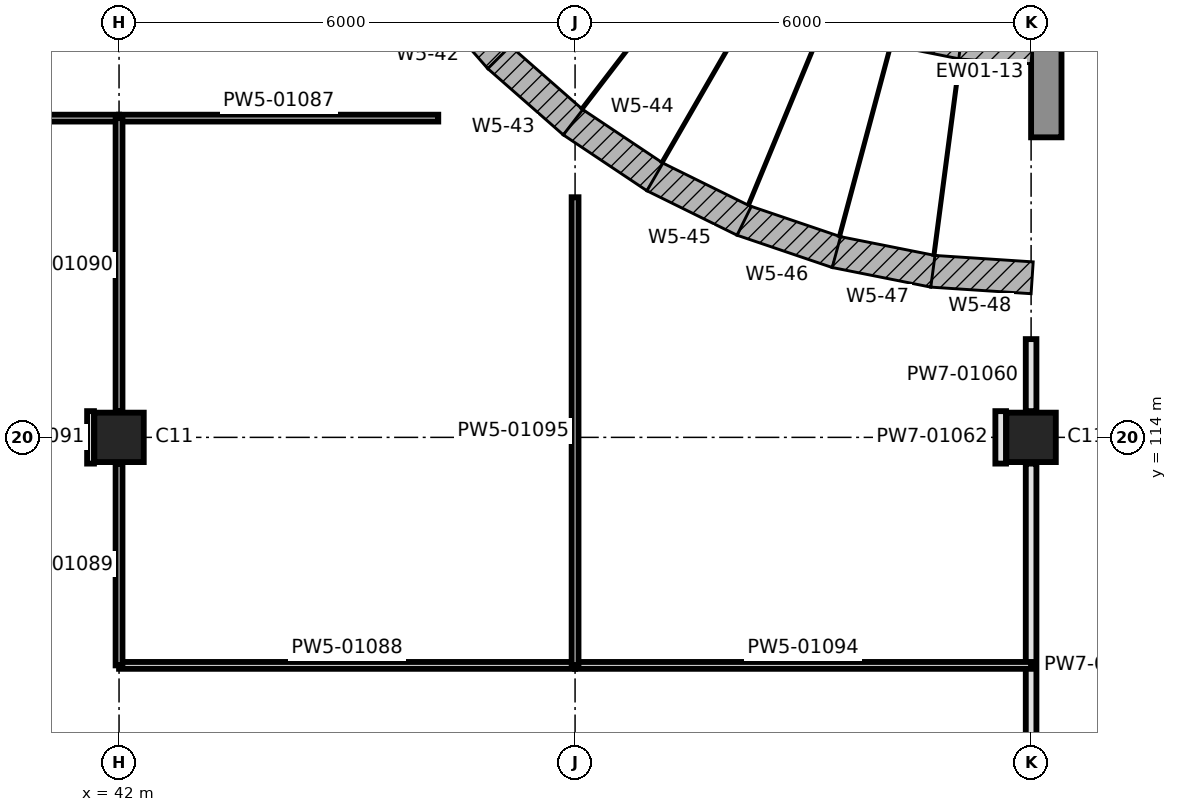
"""IFC4 building model, lengths in metres.
Left out: names, types, materials, properties, quantities, classifications, styles, units other than length and angle.
Written with IfcOpenShell. Run it as: python <this file> out.ifc"""

import sys

from ifc_helpers import new_model, si_unit, direction, frame, frame_2d, origin, origin_2d, place, context, subcontext, project, spatial, polyline, rectangle, outline, extrude, element, fill, save


model = new_model("IFC4")
c1 = context("Model", 3, precision=1e-05, world=origin(), true_north=direction((0.0, 1.0)))
c2 = subcontext(c1, "Body", "Model", "MODEL_VIEW")
j1 = project(units=[si_unit("LENGTHUNIT", "METRE"), si_unit("PLANEANGLEUNIT", "RADIAN")], contexts=[c1])
p1 = place(None, origin())
s1 = spatial("IfcSite", under=j1, at=p1, CompositionType="ELEMENT")
p2 = place(p1, origin())
s2 = spatial("IfcBuilding", under=s1, at=p2, CompositionType="ELEMENT")
p3 = place(p2, frame((0.0, 0.0, 7.0)))
s3 = spatial("IfcBuildingStorey", under=s2, at=p3, CompositionType="ELEMENT", Elevation=7.0)
for number, where, z_axis, x_axis in (
    (1, (42.0, 114.0, 0.0), (0.0, 0.0, 1.0), (1.0, 0.0, 0.0)),
    (2, (54.0, 114.0, 0.0), (0.0, 0.0, 1.0), (1.0, 0.0, 0.0)),
):
    element("IfcColumn", number, at=place(p3, frame(where, z_axis=z_axis, x_axis=x_axis)), inside=s3, PredefinedType="COLUMN", context=c2, shape_type="SweptSolid", body=[
        extrude(rectangle(XDim=0.65, YDim=0.65, at=origin_2d()), origin(), (0.0, 0.0, 1.0), 5.0),
    ])
p4 = place(p3, frame((46.852, 118.851, 0.0), z_axis=(-0.630572172367, -0.553093552863, 0.544487150645), x_axis=(-0.659421060078, 0.751773812455, -2.0792921e-05)))
e3 = element("IfcWall", 3, at=p4, inside=s3, PredefinedType="SOLIDWALL", context=c2, shape_type="SweptSolid", body=[
    extrude(outline(polyline([(0.0, 0.0), (1.322, 5.551e-17), (1.124, -5.544), (0.197, -5.544), (0.0, 0.0)])), origin(), (0.0, 0.544, 0.839), 0.596),
])
p5 = place(p3, frame((47.846, 117.979, 0.0), z_axis=(-0.553093552863, -0.630572172367, 0.544487150645), x_axis=(-0.751773812455, 0.659421060078, 2.0792921e-05)))
e4 = element("IfcWall", 4, at=p5, inside=s3, PredefinedType="SOLIDWALL", context=c2, shape_type="SweptSolid", body=[
    extrude(outline(polyline([(0.0, 0.0), (1.322, -5.551e-17), (1.125, -5.544), (0.198, -5.544), (0.0, 0.0)])), origin(), (-0.0, 0.544, 0.839), 0.596),
])
p6 = place(p3, frame((48.945, 117.244, 0.0), z_axis=(-0.465979494917, -0.697421440223, 0.544487323116), x_axis=(-0.831490422718, 0.555539086285, -2.3173265e-05)))
e5 = element("IfcWall", 5, at=p6, inside=s3, PredefinedType="SOLIDWALL", context=c2, shape_type="SweptSolid", body=[
    extrude(outline(polyline([(0.0, 0.0), (1.322, 0.0), (1.124, -5.544), (0.198, -5.544), (0.0, 0.0)])), origin(), (3.705e-05, 0.544, 0.839), 0.596),
])
p7 = place(p3, frame((50.131, 116.659, 0.0), z_axis=(-0.371027167972, -0.752251892463, 0.544477667964), x_axis=(-0.896847076605, 0.442340729705, -5.472957e-06)))
e6 = element("IfcWall", 6, at=p7, inside=s3, PredefinedType="SOLIDWALL", context=c2, shape_type="SweptSolid", body=[
    extrude(outline(polyline([(0.0, 0.0), (1.322, 0.0), (1.125, -5.544), (0.198, -5.544), (0.0, 0.0)])), origin(), (-5.786e-05, 0.544, 0.839), 0.596),
])
p8 = place(p3, frame((51.384, 116.235, 0.0), z_axis=(-0.269418488523, -0.794324736016, 0.544483141883), x_axis=(-0.947003545328, 0.321223106822, 2.7908524e-05)))
e7 = element("IfcWall", 7, at=p8, inside=s3, PredefinedType="SOLIDWALL", context=c2, shape_type="SweptSolid", body=[
    extrude(outline(polyline([(0.0, 0.0), (1.322, -5.551e-17), (1.124, -5.544), (0.197, -5.544), (0.0, 0.0)])), origin(), (0.0, 0.544, 0.839), 0.596),
])
p9 = place(p3, frame((52.68, 115.977, 0.0), z_axis=(-0.163726196101, -0.822637628243, 0.544482382919), x_axis=(-0.980766332218, 0.19518555592, -1.8656341e-05)))
e8 = element("IfcWall", 8, at=p9, inside=s3, PredefinedType="SOLIDWALL", context=c2, shape_type="SweptSolid", body=[
    extrude(outline(polyline([(0.0, 0.0), (1.322, 0.0), (1.125, -5.544), (0.198, -5.544), (0.0, 0.0)])), origin(), (-9.736e-05, 0.544, 0.839), 0.596),
])
p10 = place(p3, frame((54.0, 115.89, 0.0), z_axis=(-0.054899407289, -0.836965590728, 0.544494862249), x_axis=(-0.997853997628, 0.065478224383, 3.9353391e-05)))
e9 = element("IfcWall", 9, at=p10, inside=s3, PredefinedType="SOLIDWALL", context=c2, shape_type="SweptSolid", body=[
    extrude(outline(polyline([(0.0, 0.0), (1.322, 0.0), (1.125, -5.544), (0.198, -5.544), (0.0, 0.0)])), origin(), (-7.539e-05, 0.544, 0.839), 0.596),
])
p11 = place(p3, frame((54.2, 117.947, 0.0), z_axis=(0.0, 0.0, 1.0), x_axis=(0.0, 1.0, 0.0)))
e10 = element("IfcWall", 10, at=p11, inside=s3, PredefinedType="SOLIDWALL", context=c2, shape_type="SweptSolid", body=[
    extrude(rectangle(XDim=1.728, YDim=0.4, at=frame_2d((0.864, 0.0))), origin(), (0.0, 0.0, 1.0), 4.05),
])
p12 = place(p3, frame((54.0, 108.345, 0.0), z_axis=(0.0, 0.0, 1.0), x_axis=(0.0, 1.0, 0.0)))
e11 = element("IfcWall", 11, at=p12, inside=s3, PredefinedType="PARTITIONING", context=c2, shape_type="SweptSolid", body=[
    extrude(rectangle(XDim=5.31, YDim=0.14, at=frame_2d((2.655, 0.0))), origin(), (0.0, 0.0, 1.0), 4.05),
])
p13 = place(p12, frame((0.205, 0.0, 0.0)))
e12 = element("IfcOpeningElement", 12, at=p13, cuts=e11, PredefinedType="OPENING", context=c2, shape_type="SweptSolid", body=[
    extrude(rectangle(XDim=1.8, YDim=2.1, at=frame_2d((0.9, 1.05))), frame((0.0, 0.08, 0.0), z_axis=(0.0, -1.0, 0.0), x_axis=(1.0, 0.0, 0.0)), (0.0, 0.0, 1.0), 0.16),
])
p14 = place(p3, frame((54.0, 114.345, 0.0), z_axis=(0.0, 0.0, 1.0), x_axis=(0.0, 1.0, 0.0)))
e13 = element("IfcWall", 13, at=p14, inside=s3, PredefinedType="PARTITIONING", context=c2, shape_type="SweptSolid", body=[
    extrude(rectangle(XDim=0.948, YDim=0.14, at=frame_2d((0.474, 0.0))), origin(), (0.0, 0.0, 1.0), 4.05),
])
p15 = place(p3, frame((53.6, 113.655, 0.0), z_axis=(0.0, 0.0, 1.0), x_axis=(0.0, 1.0, 0.0)))
e14 = element("IfcWall", 14, at=p15, inside=s3, PredefinedType="PARTITIONING", context=c2, shape_type="SweptSolid", body=[
    extrude(rectangle(XDim=0.69, YDim=0.14, at=frame_2d((0.345, 0.0))), origin(), (0.0, 0.0, 1.0), 4.75),
])
p16 = place(p3, frame((28.0, 118.2, 0.0), z_axis=(0.0, 0.0, 1.0), x_axis=(1.0, 0.0, 0.0)))
e15 = element("IfcWall", 15, at=p16, inside=s3, PredefinedType="PARTITIONING", context=c2, shape_type="SweptSolid", body=[
    extrude(rectangle(XDim=14.0, YDim=0.09, at=frame_2d((7.0, 0.0))), origin(), (0.0, 0.0, 1.0), 4.05),
])
p17 = place(p16, frame((6.05, 0.0, 0.0)))
e16 = element("IfcOpeningElement", 16, at=p17, cuts=e15, PredefinedType="OPENING", context=c2, shape_type="SweptSolid", body=[
    extrude(rectangle(XDim=1.8, YDim=2.1, at=frame_2d((0.9, 1.05))), frame((0.0, 0.055, 0.0), z_axis=(0.0, -1.0, 0.0), x_axis=(1.0, 0.0, 0.0)), (0.0, 0.0, 1.0), 0.11),
])
p18 = place(p3, frame((42.0, 118.2, 0.0), z_axis=(0.0, 0.0, 1.0), x_axis=(1.0, 0.0, 0.0)))
e17 = element("IfcWall", 17, at=p18, inside=s3, PredefinedType="PARTITIONING", context=c2, shape_type="SweptSolid", body=[
    extrude(rectangle(XDim=4.2, YDim=0.09, at=frame_2d((2.1, 0.0))), origin(), (0.0, 0.0, 1.0), 4.75),
])
p19 = place(p3, frame((42.0, 111.0, 0.0), z_axis=(0.0, 0.0, 1.0), x_axis=(1.0, 0.0, 0.0)))
e18 = element("IfcWall", 18, at=p19, inside=s3, PredefinedType="PARTITIONING", context=c2, shape_type="SweptSolid", body=[
    extrude(rectangle(XDim=6.0, YDim=0.09, at=frame_2d((3.0, 0.0))), origin(), (0.0, 0.0, 1.0), 4.75),
])
p20 = place(p19, frame((2.55, 0.0, 0.0)))
e19 = element("IfcOpeningElement", 19, at=p20, cuts=e18, PredefinedType="OPENING", context=c2, shape_type="SweptSolid", body=[
    extrude(rectangle(XDim=0.92, YDim=2.04, at=frame_2d((0.46, 1.02))), frame((0.0, 0.055, 0.0), z_axis=(0.0, -1.0, 0.0), x_axis=(1.0, 0.0, 0.0)), (0.0, 0.0, 1.0), 0.11),
])
p21 = place(p3, frame((42.0, 111.0, 0.0), z_axis=(0.0, 0.0, 1.0), x_axis=(0.0, 1.0, 0.0)))
e20 = element("IfcWall", 20, at=p21, inside=s3, PredefinedType="PARTITIONING", context=c2, shape_type="SweptSolid", body=[
    extrude(rectangle(XDim=2.655, YDim=0.09, at=frame_2d((1.328, 0.0))), origin(), (0.0, 0.0, 1.0), 4.75),
])
p22 = place(p3, frame((42.0, 114.345, 0.0), z_axis=(0.0, 0.0, 1.0), x_axis=(0.0, 1.0, 0.0)))
e21 = element("IfcWall", 21, at=p22, inside=s3, PredefinedType="PARTITIONING", context=c2, shape_type="SweptSolid", body=[
    extrude(rectangle(XDim=3.855, YDim=0.09, at=frame_2d((1.927, 0.0))), origin(), (0.0, 0.0, 1.0), 4.75),
])
p23 = place(p3, frame((41.625, 113.655, 0.0), z_axis=(0.0, 0.0, 1.0), x_axis=(0.0, 1.0, 0.0)))
e22 = element("IfcWall", 22, at=p23, inside=s3, PredefinedType="PARTITIONING", context=c2, shape_type="SweptSolid", body=[
    extrude(rectangle(XDim=0.69, YDim=0.09, at=frame_2d((0.345, 0.0))), origin(), (0.0, 0.0, 1.0), 4.75),
])
p24 = place(p3, frame((48.0, 111.0, 0.0), z_axis=(0.0, 0.0, 1.0), x_axis=(1.0, 0.0, 0.0)))
e23 = element("IfcWall", 23, at=p24, inside=s3, PredefinedType="PARTITIONING", context=c2, shape_type="SweptSolid", body=[
    extrude(rectangle(XDim=6.0, YDim=0.09, at=frame_2d((3.0, 0.0))), origin(), (0.0, 0.0, 1.0), 4.75),
])
p25 = place(p24, frame((2.55, 0.0, 0.0)))
e24 = element("IfcOpeningElement", 24, at=p25, cuts=e23, PredefinedType="OPENING", context=c2, shape_type="SweptSolid", body=[
    extrude(rectangle(XDim=0.92, YDim=2.04, at=frame_2d((0.46, 1.02))), frame((0.0, 0.055, 0.0), z_axis=(0.0, -1.0, 0.0), x_axis=(1.0, 0.0, 0.0)), (0.0, 0.0, 1.0), 0.11),
])
p26 = place(p3, frame((48.0, 111.0, 0.0), z_axis=(0.0, 0.0, 1.0), x_axis=(0.0, 1.0, 0.0)))
e25 = element("IfcWall", 25, at=p26, inside=s3, PredefinedType="PARTITIONING", context=c2, shape_type="SweptSolid", body=[
    extrude(rectangle(XDim=6.159, YDim=0.09, at=frame_2d((3.08, 0.0))), origin(), (0.0, 0.0, 1.0), 4.75),
])
p27 = place(p20, origin())
e26 = element("IfcDoor", 26, at=p27, inside=s3, OperationType="SINGLE_SWING_RIGHT", PredefinedType="DOOR", context=c2, shape_type="SweptSolid", body=[
    extrude(rectangle(XDim=0.92, YDim=2.04, at=frame_2d((0.46, 1.02))), frame((0.0, 0.025, 0.0), z_axis=(0.0, -1.0, 0.0), x_axis=(1.0, 0.0, 0.0)), (0.0, 0.0, 1.0), 0.05),
])
fill(e19, e26)
p28 = place(p25, origin())
e27 = element("IfcDoor", 27, at=p28, inside=s3, OperationType="SINGLE_SWING_RIGHT", PredefinedType="DOOR", context=c2, shape_type="SweptSolid", body=[
    extrude(rectangle(XDim=0.92, YDim=2.04, at=frame_2d((0.46, 1.02))), frame((0.0, 0.025, 0.0), z_axis=(0.0, -1.0, 0.0), x_axis=(1.0, 0.0, 0.0)), (0.0, 0.0, 1.0), 0.05),
])
fill(e24, e27)
p29 = place(p13, origin())
e28 = element("IfcDoor", 28, at=p29, inside=s3, OperationType="DOUBLE_DOOR_SINGLE_SWING", PredefinedType="DOOR", context=c2, shape_type="SweptSolid", body=[
    extrude(rectangle(XDim=1.8, YDim=2.1, at=frame_2d((0.9, 1.05))), frame((0.0, 0.025, 0.0), z_axis=(0.0, -1.0, 0.0), x_axis=(1.0, 0.0, 0.0)), (0.0, 0.0, 1.0), 0.05),
])
fill(e12, e28)
save(model, sys.argv[1])
